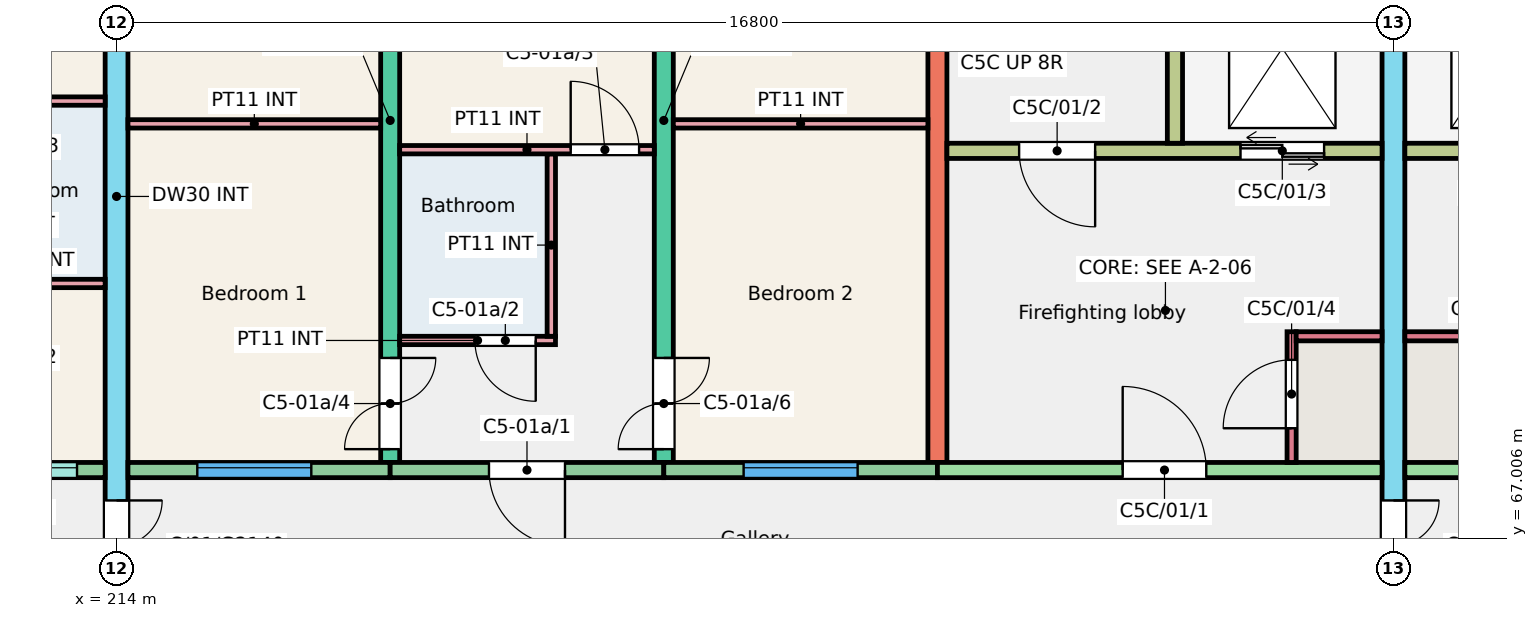
"""IFC4 building model, lengths in metres.
Left out: names, types, materials, properties, quantities, classifications, styles, units other than length and angle.
Written with IfcOpenShell. Run it as: python <this file> out.ifc"""

import sys

from ifc_helpers import new_model, si_unit, direction, frame, frame_2d, origin, place, context, subcontext, project, spatial, rectangle, extrude, element, fill, save


model = new_model("IFC4")
c1 = context("Model", 3, precision=1e-05, world=origin(), true_north=direction((0.0, 1.0)))
c2 = subcontext(c1, "Body", "Model", "MODEL_VIEW")
j1 = project(units=[si_unit("LENGTHUNIT", "METRE"), si_unit("PLANEANGLEUNIT", "RADIAN")], contexts=[c1])
p1 = place(None, origin())
s1 = spatial("IfcSite", under=j1, at=p1, CompositionType="ELEMENT")
p2 = place(p1, origin())
s2 = spatial("IfcBuilding", under=s1, at=p2, CompositionType="ELEMENT")
p3 = place(p2, frame((0.0, 0.0, 3.0)))
s3 = spatial("IfcBuildingStorey", under=s2, at=p3, CompositionType="ELEMENT", Elevation=3.0)
p4 = place(p3, frame((214.0, 66.0, 0.0), z_axis=(0.0, 0.0, 1.0), x_axis=(0.0, 1.0, 0.0)))
e1 = element("IfcWall", 1, at=p4, inside=s3, PredefinedType="SHEAR", context=c2, shape_type="SweptSolid", body=[
    extrude(rectangle(XDim=11.0, YDim=0.3, at=frame_2d((5.5, 0.0))), origin(), (0.0, 0.0, 1.0), 3.0),
])
p5 = place(p4, frame((0.3, 0.0, 0.0)))
e2 = element("IfcOpeningElement", 2, at=p5, cuts=e1, PredefinedType="OPENING", context=c2, shape_type="SweptSolid", body=[
    extrude(rectangle(XDim=1.2, YDim=2.1, at=frame_2d((0.6, 1.05))), frame((0.0, 0.16, 0.0), z_axis=(0.0, -1.0, 0.0), x_axis=(1.0, 0.0, 0.0)), (0.0, 0.0, 1.0), 0.32),
])
p6 = place(p3, frame((217.6, 68.0, 0.0), z_axis=(0.0, 0.0, 1.0), x_axis=(0.0, 1.0, 0.0)))
e3 = element("IfcWall", 3, at=p6, inside=s3, PredefinedType="SHEAR", context=c2, shape_type="SweptSolid", body=[
    extrude(rectangle(XDim=9.0, YDim=0.25, at=frame_2d((4.5, 0.0))), origin(), (0.0, 0.0, 1.0), 3.0),
])
p7 = place(p6, frame((0.175, 0.0, 0.0)))
e4 = element("IfcOpeningElement", 4, at=p7, cuts=e3, PredefinedType="OPENING", context=c2, shape_type="SweptSolid", body=[
    extrude(rectangle(XDim=1.2, YDim=2.1, at=frame_2d((0.6, 1.05))), frame((0.0, 0.135, 0.0), z_axis=(0.0, -1.0, 0.0), x_axis=(1.0, 0.0, 0.0)), (0.0, 0.0, 1.0), 0.27),
])
p8 = place(p6, frame((6.4, 0.0, 0.0)))
e5 = element("IfcOpeningElement", 5, at=p8, cuts=e3, PredefinedType="OPENING", context=c2, shape_type="SweptSolid", body=[
    extrude(rectangle(XDim=1.2, YDim=2.1, at=frame_2d((0.6, 1.05))), frame((0.0, 0.135, 0.0), z_axis=(0.0, -1.0, 0.0), x_axis=(1.0, 0.0, 0.0)), (0.0, 0.0, 1.0), 0.27),
])
p9 = place(p3, frame((221.2, 68.0, 0.0), z_axis=(0.0, 0.0, 1.0), x_axis=(0.0, 1.0, 0.0)))
e6 = element("IfcWall", 6, at=p9, inside=s3, PredefinedType="SHEAR", context=c2, shape_type="SweptSolid", body=[
    extrude(rectangle(XDim=9.0, YDim=0.25, at=frame_2d((4.5, 0.0))), origin(), (0.0, 0.0, 1.0), 3.0),
])
p10 = place(p9, frame((0.175, 0.0, 0.0)))
e7 = element("IfcOpeningElement", 7, at=p10, cuts=e6, PredefinedType="OPENING", context=c2, shape_type="SweptSolid", body=[
    extrude(rectangle(XDim=1.2, YDim=2.1, at=frame_2d((0.6, 1.05))), frame((0.0, 0.135, 0.0), z_axis=(0.0, -1.0, 0.0), x_axis=(1.0, 0.0, 0.0)), (0.0, 0.0, 1.0), 0.27),
])
p11 = place(p9, frame((6.4, 0.0, 0.0)))
e8 = element("IfcOpeningElement", 8, at=p11, cuts=e6, PredefinedType="OPENING", context=c2, shape_type="SweptSolid", body=[
    extrude(rectangle(XDim=1.2, YDim=2.1, at=frame_2d((0.6, 1.05))), frame((0.0, 0.135, 0.0), z_axis=(0.0, -1.0, 0.0), x_axis=(1.0, 0.0, 0.0)), (0.0, 0.0, 1.0), 0.27),
])
p12 = place(p3, frame((224.8, 68.0, 0.0), z_axis=(0.0, 0.0, 1.0), x_axis=(0.0, 1.0, 0.0)))
e9 = element("IfcWall", 9, at=p12, inside=s3, PredefinedType="SHEAR", context=c2, shape_type="SweptSolid", body=[
    extrude(rectangle(XDim=9.0, YDim=0.25, at=frame_2d((4.5, 0.0))), origin(), (0.0, 0.0, 1.0), 3.0),
])
p13 = place(p3, frame((230.8, 66.0, 0.0), z_axis=(0.0, 0.0, 1.0), x_axis=(0.0, 1.0, 0.0)))
e10 = element("IfcWall", 10, at=p13, inside=s3, PredefinedType="SHEAR", context=c2, shape_type="SweptSolid", body=[
    extrude(rectangle(XDim=11.0, YDim=0.3, at=frame_2d((5.5, 0.0))), origin(), (0.0, 0.0, 1.0), 3.0),
])
p14 = place(p13, frame((0.3, 0.0, 0.0)))
e11 = element("IfcOpeningElement", 11, at=p14, cuts=e10, PredefinedType="OPENING", context=c2, shape_type="SweptSolid", body=[
    extrude(rectangle(XDim=1.2, YDim=2.1, at=frame_2d((0.6, 1.05))), frame((0.0, 0.16, 0.0), z_axis=(0.0, -1.0, 0.0), x_axis=(1.0, 0.0, 0.0)), (0.0, 0.0, 1.0), 0.32),
])
p15 = place(p3, frame((210.4, 67.9, 0.0), z_axis=(0.0, 0.0, 1.0), x_axis=(1.0, 0.0, 0.0)))
e12 = element("IfcWall", 12, at=p15, inside=s3, PredefinedType="SOLIDWALL", context=c2, shape_type="SweptSolid", body=[
    extrude(rectangle(XDim=3.45, YDim=0.2, at=frame_2d((1.725, 0.0))), origin(), (0.0, 0.0, 1.0), 3.0),
])
p16 = place(p15, frame((1.88, 0.0, 1.1)))
e13 = element("IfcOpeningElement", 13, at=p16, cuts=e12, PredefinedType="OPENING", context=c2, shape_type="SweptSolid", body=[
    extrude(rectangle(XDim=1.2, YDim=1.3, at=frame_2d((0.6, 0.65))), frame((0.0, 0.11, 0.0), z_axis=(0.0, -1.0, 0.0), x_axis=(1.0, 0.0, 0.0)), (0.0, 0.0, 1.0), 0.22),
])
p17 = place(p15, frame((0.25, 0.0, 0.0)))
e14 = element("IfcOpeningElement", 14, at=p17, cuts=e12, PredefinedType="OPENING", context=c2, shape_type="SweptSolid", body=[
    extrude(rectangle(XDim=1.0, YDim=2.1, at=frame_2d((0.5, 1.05))), frame((0.0, 0.11, 0.0), z_axis=(0.0, -1.0, 0.0), x_axis=(1.0, 0.0, 0.0)), (0.0, 0.0, 1.0), 0.22),
])
p18 = place(p3, frame((214.15, 67.9, 0.0), z_axis=(0.0, 0.0, 1.0), x_axis=(1.0, 0.0, 0.0)))
e15 = element("IfcWall", 15, at=p18, inside=s3, PredefinedType="SOLIDWALL", context=c2, shape_type="SweptSolid", body=[
    extrude(rectangle(XDim=3.45, YDim=0.2, at=frame_2d((1.725, 0.0))), origin(), (0.0, 0.0, 1.0), 3.0),
])
p19 = place(p18, frame((0.913, 0.0, 0.9)))
e16 = element("IfcOpeningElement", 16, at=p19, cuts=e15, PredefinedType="OPENING", context=c2, shape_type="SweptSolid", body=[
    extrude(rectangle(XDim=1.5, YDim=1.5, at=frame_2d((0.75, 0.75))), frame((0.0, 0.11, 0.0), z_axis=(0.0, -1.0, 0.0), x_axis=(1.0, 0.0, 0.0)), (0.0, 0.0, 1.0), 0.22),
])
p20 = place(p3, frame((217.6, 67.9, 0.0), z_axis=(0.0, 0.0, 1.0), x_axis=(1.0, 0.0, 0.0)))
e17 = element("IfcWall", 17, at=p20, inside=s3, PredefinedType="SOLIDWALL", context=c2, shape_type="SweptSolid", body=[
    extrude(rectangle(XDim=3.6, YDim=0.2, at=frame_2d((1.8, 0.0))), origin(), (0.0, 0.0, 1.0), 3.0),
])
p21 = place(p20, frame((1.3, 0.0, 0.0)))
e18 = element("IfcOpeningElement", 18, at=p21, cuts=e17, PredefinedType="OPENING", context=c2, shape_type="SweptSolid", body=[
    extrude(rectangle(XDim=1.0, YDim=2.1, at=frame_2d((0.5, 1.05))), frame((0.0, 0.11, 0.0), z_axis=(0.0, -1.0, 0.0), x_axis=(1.0, 0.0, 0.0)), (0.0, 0.0, 1.0), 0.22),
])
p22 = place(p3, frame((221.2, 67.9, 0.0), z_axis=(0.0, 0.0, 1.0), x_axis=(1.0, 0.0, 0.0)))
e19 = element("IfcWall", 19, at=p22, inside=s3, PredefinedType="SOLIDWALL", context=c2, shape_type="SweptSolid", body=[
    extrude(rectangle(XDim=3.6, YDim=0.2, at=frame_2d((1.8, 0.0))), origin(), (0.0, 0.0, 1.0), 3.0),
])
p23 = place(p22, frame((1.05, 0.0, 0.9)))
e20 = element("IfcOpeningElement", 20, at=p23, cuts=e19, PredefinedType="OPENING", context=c2, shape_type="SweptSolid", body=[
    extrude(rectangle(XDim=1.5, YDim=1.5, at=frame_2d((0.75, 0.75))), frame((0.0, 0.11, 0.0), z_axis=(0.0, -1.0, 0.0), x_axis=(1.0, 0.0, 0.0)), (0.0, 0.0, 1.0), 0.22),
])
p24 = place(p3, frame((224.8, 67.9, 0.0), z_axis=(0.0, 0.0, 1.0), x_axis=(1.0, 0.0, 0.0)))
e21 = element("IfcWall", 21, at=p24, inside=s3, PredefinedType="SHEAR", context=c2, shape_type="SweptSolid", body=[
    extrude(rectangle(XDim=5.85, YDim=0.2, at=frame_2d((2.925, 0.0))), origin(), (0.0, 0.0, 1.0), 3.0),
])
p25 = place(p24, frame((2.438, 0.0, 0.0)))
e22 = element("IfcOpeningElement", 22, at=p25, cuts=e21, PredefinedType="OPENING", context=c2, shape_type="SweptSolid", body=[
    extrude(rectangle(XDim=1.1, YDim=2.1, at=frame_2d((0.55, 1.05))), frame((0.0, 0.11, 0.0), z_axis=(0.0, -1.0, 0.0), x_axis=(1.0, 0.0, 0.0)), (0.0, 0.0, 1.0), 0.22),
])
p26 = place(p3, frame((224.925, 72.1, 0.0), z_axis=(0.0, 0.0, 1.0), x_axis=(1.0, 0.0, 0.0)))
e23 = element("IfcWall", 23, at=p26, inside=s3, PredefinedType="SHEAR", context=c2, shape_type="SweptSolid", body=[
    extrude(rectangle(XDim=5.725, YDim=0.2, at=frame_2d((2.862, 0.0))), origin(), (0.0, 0.0, 1.0), 3.0),
])
p27 = place(p26, frame((0.95, 0.0, 0.0)))
e24 = element("IfcOpeningElement", 24, at=p27, cuts=e23, PredefinedType="OPENING", context=c2, shape_type="SweptSolid", body=[
    extrude(rectangle(XDim=1.0, YDim=2.1, at=frame_2d((0.5, 1.05))), frame((0.0, 0.11, 0.0), z_axis=(0.0, -1.0, 0.0), x_axis=(1.0, 0.0, 0.0)), (0.0, 0.0, 1.0), 0.22),
])
p28 = place(p26, frame((3.863, 0.0, 0.0)))
e25 = element("IfcOpeningElement", 25, at=p28, cuts=e23, PredefinedType="OPENING", context=c2, shape_type="SweptSolid", body=[
    extrude(rectangle(XDim=1.1, YDim=2.1, at=frame_2d((0.55, 1.05))), frame((0.0, 0.11, 0.0), z_axis=(0.0, -1.0, 0.0), x_axis=(1.0, 0.0, 0.0)), (0.0, 0.0, 1.0), 0.22),
])
p29 = place(p3, frame((227.925, 72.2, 0.0), z_axis=(0.0, 0.0, 1.0), x_axis=(0.0, 1.0, 0.0)))
e26 = element("IfcWall", 26, at=p29, inside=s3, PredefinedType="SHEAR", context=c2, shape_type="SweptSolid", body=[
    extrude(rectangle(XDim=4.8, YDim=0.2, at=frame_2d((2.4, 0.0))), origin(), (0.0, 0.0, 1.0), 3.0),
])
p30 = place(p3, frame((229.46, 68.0, 0.0), z_axis=(0.0, 0.0, 1.0), x_axis=(0.0, 1.0, 0.0)))
e27 = element("IfcWall", 27, at=p30, inside=s3, PredefinedType="SHEAR", context=c2, shape_type="SweptSolid", body=[
    extrude(rectangle(XDim=1.72, YDim=0.12, at=frame_2d((0.86, 0.0))), origin(), (0.0, 0.0, 1.0), 3.0),
])
p31 = place(p30, frame((0.45, 0.0, 0.0)))
e28 = element("IfcOpeningElement", 28, at=p31, cuts=e27, PredefinedType="OPENING", context=c2, shape_type="SweptSolid", body=[
    extrude(rectangle(XDim=0.9, YDim=2.1, at=frame_2d((0.45, 1.05))), frame((0.0, 0.07, 0.0), z_axis=(0.0, -1.0, 0.0), x_axis=(1.0, 0.0, 0.0)), (0.0, 0.0, 1.0), 0.14),
])
p32 = place(p3, frame((229.52, 69.66, 0.0), z_axis=(0.0, 0.0, 1.0), x_axis=(1.0, 0.0, 0.0)))
e29 = element("IfcWall", 29, at=p32, inside=s3, PredefinedType="SHEAR", context=c2, shape_type="SweptSolid", body=[
    extrude(rectangle(XDim=1.13, YDim=0.12, at=frame_2d((0.565, 0.0))), origin(), (0.0, 0.0, 1.0), 3.0),
])
p33 = place(p3, frame((230.95, 67.9, 0.0), z_axis=(0.0, 0.0, 1.0), x_axis=(1.0, 0.0, 0.0)))
e30 = element("IfcWall", 30, at=p33, inside=s3, PredefinedType="SHEAR", context=c2, shape_type="SweptSolid", body=[
    extrude(rectangle(XDim=5.85, YDim=0.2, at=frame_2d((2.925, 0.0))), origin(), (0.0, 0.0, 1.0), 3.0),
])
p34 = place(p33, frame((2.312, 0.0, 0.0)))
e31 = element("IfcOpeningElement", 31, at=p34, cuts=e30, PredefinedType="OPENING", context=c2, shape_type="SweptSolid", body=[
    extrude(rectangle(XDim=1.1, YDim=2.1, at=frame_2d((0.55, 1.05))), frame((0.0, 0.11, 0.0), z_axis=(0.0, -1.0, 0.0), x_axis=(1.0, 0.0, 0.0)), (0.0, 0.0, 1.0), 0.22),
])
p35 = place(p3, frame((230.95, 72.1, 0.0), z_axis=(0.0, 0.0, 1.0), x_axis=(1.0, 0.0, 0.0)))
e32 = element("IfcWall", 32, at=p35, inside=s3, PredefinedType="SHEAR", context=c2, shape_type="SweptSolid", body=[
    extrude(rectangle(XDim=5.725, YDim=0.2, at=frame_2d((2.863, 0.0))), origin(), (0.0, 0.0, 1.0), 3.0),
])
p36 = place(p35, frame((3.775, 0.0, 0.0)))
e33 = element("IfcOpeningElement", 33, at=p36, cuts=e32, PredefinedType="OPENING", context=c2, shape_type="SweptSolid", body=[
    extrude(rectangle(XDim=1.0, YDim=2.1, at=frame_2d((0.5, 1.05))), frame((0.0, 0.11, 0.0), z_axis=(0.0, -1.0, 0.0), x_axis=(1.0, 0.0, 0.0)), (0.0, 0.0, 1.0), 0.22),
])
p37 = place(p35, frame((0.762, 0.0, 0.0)))
e34 = element("IfcOpeningElement", 34, at=p37, cuts=e32, PredefinedType="OPENING", context=c2, shape_type="SweptSolid", body=[
    extrude(rectangle(XDim=1.1, YDim=2.1, at=frame_2d((0.55, 1.05))), frame((0.0, 0.11, 0.0), z_axis=(0.0, -1.0, 0.0), x_axis=(1.0, 0.0, 0.0)), (0.0, 0.0, 1.0), 0.22),
])
p38 = place(p3, frame((230.95, 69.66, 0.0), z_axis=(0.0, 0.0, 1.0), x_axis=(1.0, 0.0, 0.0)))
e35 = element("IfcWall", 35, at=p38, inside=s3, PredefinedType="SHEAR", context=c2, shape_type="SweptSolid", body=[
    extrude(rectangle(XDim=1.13, YDim=0.12, at=frame_2d((0.565, 0.0))), origin(), (0.0, 0.0, 1.0), 3.0),
])
p39 = place(p3, frame((211.91, 70.355, 0.0), z_axis=(0.0, 0.0, 1.0), x_axis=(1.0, 0.0, 0.0)))
e36 = element("IfcWall", 36, at=p39, inside=s3, PredefinedType="PARTITIONING", context=c2, shape_type="SweptSolid", body=[
    extrude(rectangle(XDim=1.94, YDim=0.11, at=frame_2d((0.97, 0.0))), origin(), (0.0, 0.0, 1.0), 2.8),
])
p40 = place(p3, frame((210.5, 72.755, 0.0), z_axis=(0.0, 0.0, 1.0), x_axis=(1.0, 0.0, 0.0)))
e37 = element("IfcWall", 37, at=p40, inside=s3, PredefinedType="PARTITIONING", context=c2, shape_type="SweptSolid", body=[
    extrude(rectangle(XDim=3.35, YDim=0.11, at=frame_2d((1.675, 0.0))), origin(), (0.0, 0.0, 1.0), 2.8),
])
p41 = place(p40, frame((0.2, 0.0, 0.0)))
e38 = element("IfcOpeningElement", 38, at=p41, cuts=e37, PredefinedType="OPENING", context=c2, shape_type="SweptSolid", body=[
    extrude(rectangle(XDim=0.9, YDim=2.1, at=frame_2d((0.45, 1.05))), frame((0.0, 0.065, 0.0), z_axis=(0.0, -1.0, 0.0), x_axis=(1.0, 0.0, 0.0)), (0.0, 0.0, 1.0), 0.13),
])
p42 = place(p3, frame((217.725, 69.605, 0.0), z_axis=(0.0, 0.0, 1.0), x_axis=(1.0, 0.0, 0.0)))
e39 = element("IfcWall", 39, at=p42, inside=s3, PredefinedType="PARTITIONING", context=c2, shape_type="SweptSolid", body=[
    extrude(rectangle(XDim=2.05, YDim=0.11, at=frame_2d((1.025, 0.0))), origin(), (0.0, 0.0, 1.0), 2.8),
])
p43 = place(p42, frame((0.99, 0.0, 0.0)))
e40 = element("IfcOpeningElement", 40, at=p43, cuts=e39, PredefinedType="OPENING", context=c2, shape_type="SweptSolid", body=[
    extrude(rectangle(XDim=0.8, YDim=2.1, at=frame_2d((0.4, 1.05))), frame((0.0, 0.065, 0.0), z_axis=(0.0, -1.0, 0.0), x_axis=(1.0, 0.0, 0.0)), (0.0, 0.0, 1.0), 0.13),
])
p44 = place(p3, frame((219.72, 69.66, 0.0), z_axis=(0.0, 0.0, 1.0), x_axis=(0.0, 1.0, 0.0)))
e41 = element("IfcWall", 41, at=p44, inside=s3, PredefinedType="PARTITIONING", context=c2, shape_type="SweptSolid", body=[
    extrude(rectangle(XDim=2.4, YDim=0.11, at=frame_2d((1.2, 0.0))), origin(), (0.0, 0.0, 1.0), 2.8),
])
p45 = place(p3, frame((217.725, 72.115, 0.0), z_axis=(0.0, 0.0, 1.0), x_axis=(1.0, 0.0, 0.0)))
e42 = element("IfcWall", 42, at=p45, inside=s3, PredefinedType="PARTITIONING", context=c2, shape_type="SweptSolid", body=[
    extrude(rectangle(XDim=3.35, YDim=0.11, at=frame_2d((1.675, 0.0))), origin(), (0.0, 0.0, 1.0), 2.8),
])
p46 = place(p45, frame((2.25, 0.0, 0.0)))
e43 = element("IfcOpeningElement", 43, at=p46, cuts=e42, PredefinedType="OPENING", context=c2, shape_type="SweptSolid", body=[
    extrude(rectangle(XDim=0.9, YDim=2.1, at=frame_2d((0.45, 1.05))), frame((0.0, 0.065, 0.0), z_axis=(0.0, -1.0, 0.0), x_axis=(1.0, 0.0, 0.0)), (0.0, 0.0, 1.0), 0.13),
])
p47 = place(p3, frame((214.15, 72.455, 0.0), z_axis=(0.0, 0.0, 1.0), x_axis=(1.0, 0.0, 0.0)))
e44 = element("IfcWall", 44, at=p47, inside=s3, PredefinedType="PARTITIONING", context=c2, shape_type="SweptSolid", body=[
    extrude(rectangle(XDim=3.325, YDim=0.11, at=frame_2d((1.663, 0.0))), origin(), (0.0, 0.0, 1.0), 2.8),
])
p48 = place(p3, frame((221.325, 72.455, 0.0), z_axis=(0.0, 0.0, 1.0), x_axis=(1.0, 0.0, 0.0)))
e45 = element("IfcWall", 45, at=p48, inside=s3, PredefinedType="PARTITIONING", context=c2, shape_type="SweptSolid", body=[
    extrude(rectangle(XDim=3.35, YDim=0.11, at=frame_2d((1.675, 0.0))), origin(), (0.0, 0.0, 1.0), 2.8),
])
p49 = place(p16, origin())
e46 = element("IfcWindow", 46, at=p49, inside=s3, PartitioningType="SINGLE_PANEL", PredefinedType="WINDOW", context=c2, shape_type="SweptSolid", body=[
    extrude(rectangle(XDim=1.2, YDim=1.3, at=frame_2d((0.6, 0.65))), frame((0.0, 0.06, 0.0), z_axis=(0.0, -1.0, 0.0), x_axis=(1.0, 0.0, 0.0)), (0.0, 0.0, 1.0), 0.06),
])
fill(e13, e46)
p50 = place(p19, origin())
e47 = element("IfcWindow", 47, at=p50, inside=s3, PartitioningType="SINGLE_PANEL", PredefinedType="WINDOW", context=c2, shape_type="SweptSolid", body=[
    extrude(rectangle(XDim=1.5, YDim=1.5, at=frame_2d((0.75, 0.75))), frame((0.0, 0.06, 0.0), z_axis=(0.0, -1.0, 0.0), x_axis=(1.0, 0.0, 0.0)), (0.0, 0.0, 1.0), 0.06),
])
fill(e16, e47)
p51 = place(p23, origin())
e48 = element("IfcWindow", 48, at=p51, inside=s3, PartitioningType="SINGLE_PANEL", PredefinedType="WINDOW", context=c2, shape_type="SweptSolid", body=[
    extrude(rectangle(XDim=1.5, YDim=1.5, at=frame_2d((0.75, 0.75))), frame((0.0, 0.06, 0.0), z_axis=(0.0, -1.0, 0.0), x_axis=(1.0, 0.0, 0.0)), (0.0, 0.0, 1.0), 0.06),
])
fill(e20, e48)
p52 = place(p21, origin())
e49 = element("IfcDoor", 49, at=p52, inside=s3, OperationType="SINGLE_SWING_RIGHT", PredefinedType="DOOR", context=c2, shape_type="SweptSolid", body=[
    extrude(rectangle(XDim=1.0, YDim=2.1, at=frame_2d((0.5, 1.05))), frame((0.0, 0.025, 0.0), z_axis=(0.0, -1.0, 0.0), x_axis=(1.0, 0.0, 0.0)), (0.0, 0.0, 1.0), 0.05),
])
fill(e18, e49)
p53 = place(p43, origin())
e50 = element("IfcDoor", 50, at=p53, inside=s3, OperationType="SINGLE_SWING_RIGHT", PredefinedType="DOOR", context=c2, shape_type="SweptSolid", body=[
    extrude(rectangle(XDim=0.8, YDim=2.1, at=frame_2d((0.4, 1.05))), frame((0.0, 0.025, 0.0), z_axis=(0.0, -1.0, 0.0), x_axis=(1.0, 0.0, 0.0)), (0.0, 0.0, 1.0), 0.05),
])
fill(e40, e50)
p54 = place(p46, origin())
e51 = element("IfcDoor", 51, at=p54, inside=s3, OperationType="SINGLE_SWING_LEFT", PredefinedType="DOOR", context=c2, shape_type="SweptSolid", body=[
    extrude(rectangle(XDim=0.9, YDim=2.1, at=frame_2d((0.45, 1.05))), frame((0.0, 0.025, 0.0), z_axis=(0.0, -1.0, 0.0), x_axis=(1.0, 0.0, 0.0)), (0.0, 0.0, 1.0), 0.05),
])
fill(e43, e51)
p55 = place(p7, origin())
e52 = element("IfcDoor", 52, at=p55, inside=s3, OperationType="DOUBLE_DOOR_SINGLE_SWING", PredefinedType="DOOR", context=c2, shape_type="SweptSolid", body=[
    extrude(rectangle(XDim=1.2, YDim=2.1, at=frame_2d((0.6, 1.05))), frame((0.0, 0.025, 0.0), z_axis=(0.0, -1.0, 0.0), x_axis=(1.0, 0.0, 0.0)), (0.0, 0.0, 1.0), 0.05),
])
fill(e4, e52)
p56 = place(p10, origin())
e53 = element("IfcDoor", 53, at=p56, inside=s3, OperationType="DOUBLE_DOOR_SINGLE_SWING", PredefinedType="DOOR", context=c2, shape_type="SweptSolid", body=[
    extrude(rectangle(XDim=1.2, YDim=2.1, at=frame_2d((0.6, 1.05))), frame((0.0, 0.025, 0.0), z_axis=(0.0, -1.0, 0.0), x_axis=(1.0, 0.0, 0.0)), (0.0, 0.0, 1.0), 0.05),
])
fill(e7, e53)
p57 = place(p25, origin())
e54 = element("IfcDoor", 54, at=p57, inside=s3, OperationType="SINGLE_SWING_LEFT", PredefinedType="DOOR", context=c2, shape_type="SweptSolid", body=[
    extrude(rectangle(XDim=1.1, YDim=2.1, at=frame_2d((0.55, 1.05))), frame((0.0, 0.025, 0.0), z_axis=(0.0, -1.0, 0.0), x_axis=(1.0, 0.0, 0.0)), (0.0, 0.0, 1.0), 0.05),
])
fill(e22, e54)
p58 = place(p27, origin())
e55 = element("IfcDoor", 55, at=p58, inside=s3, OperationType="SINGLE_SWING_RIGHT", PredefinedType="DOOR", context=c2, shape_type="SweptSolid", body=[
    extrude(rectangle(XDim=1.0, YDim=2.1, at=frame_2d((0.5, 1.05))), frame((0.0, 0.025, 0.0), z_axis=(0.0, -1.0, 0.0), x_axis=(1.0, 0.0, 0.0)), (0.0, 0.0, 1.0), 0.05),
])
fill(e24, e55)
p59 = place(p28, origin())
e56 = element("IfcDoor", 56, at=p59, inside=s3, OperationType="DOUBLE_DOOR_SLIDING", PredefinedType="DOOR", context=c2, shape_type="SweptSolid", body=[
    extrude(rectangle(XDim=1.1, YDim=2.1, at=frame_2d((0.55, 1.05))), frame((0.0, 0.025, 0.0), z_axis=(0.0, -1.0, 0.0), x_axis=(1.0, 0.0, 0.0)), (0.0, 0.0, 1.0), 0.05),
])
fill(e25, e56)
p60 = place(p31, origin())
e57 = element("IfcDoor", 57, at=p60, inside=s3, OperationType="SINGLE_SWING_LEFT", PredefinedType="DOOR", context=c2, shape_type="SweptSolid", body=[
    extrude(rectangle(XDim=0.9, YDim=2.1, at=frame_2d((0.45, 1.05))), frame((0.0, 0.025, 0.0), z_axis=(0.0, -1.0, 0.0), x_axis=(1.0, 0.0, 0.0)), (0.0, 0.0, 1.0), 0.05),
])
fill(e28, e57)
p61 = place(p5, origin())
e58 = element("IfcDoor", 58, at=p61, inside=s3, OperationType="DOUBLE_DOOR_SINGLE_SWING", PredefinedType="DOOR", context=c2, shape_type="SweptSolid", body=[
    extrude(rectangle(XDim=1.2, YDim=2.1, at=frame_2d((0.6, 1.05))), frame((0.0, 0.025, 0.0), z_axis=(0.0, -1.0, 0.0), x_axis=(1.0, 0.0, 0.0)), (0.0, 0.0, 1.0), 0.05),
])
fill(e2, e58)
p62 = place(p14, origin())
e59 = element("IfcDoor", 59, at=p62, inside=s3, OperationType="DOUBLE_DOOR_SINGLE_SWING", PredefinedType="DOOR", context=c2, shape_type="SweptSolid", body=[
    extrude(rectangle(XDim=1.2, YDim=2.1, at=frame_2d((0.6, 1.05))), frame((0.0, 0.025, 0.0), z_axis=(0.0, -1.0, 0.0), x_axis=(1.0, 0.0, 0.0)), (0.0, 0.0, 1.0), 0.05),
])
fill(e11, e59)
save(model, sys.argv[1])
